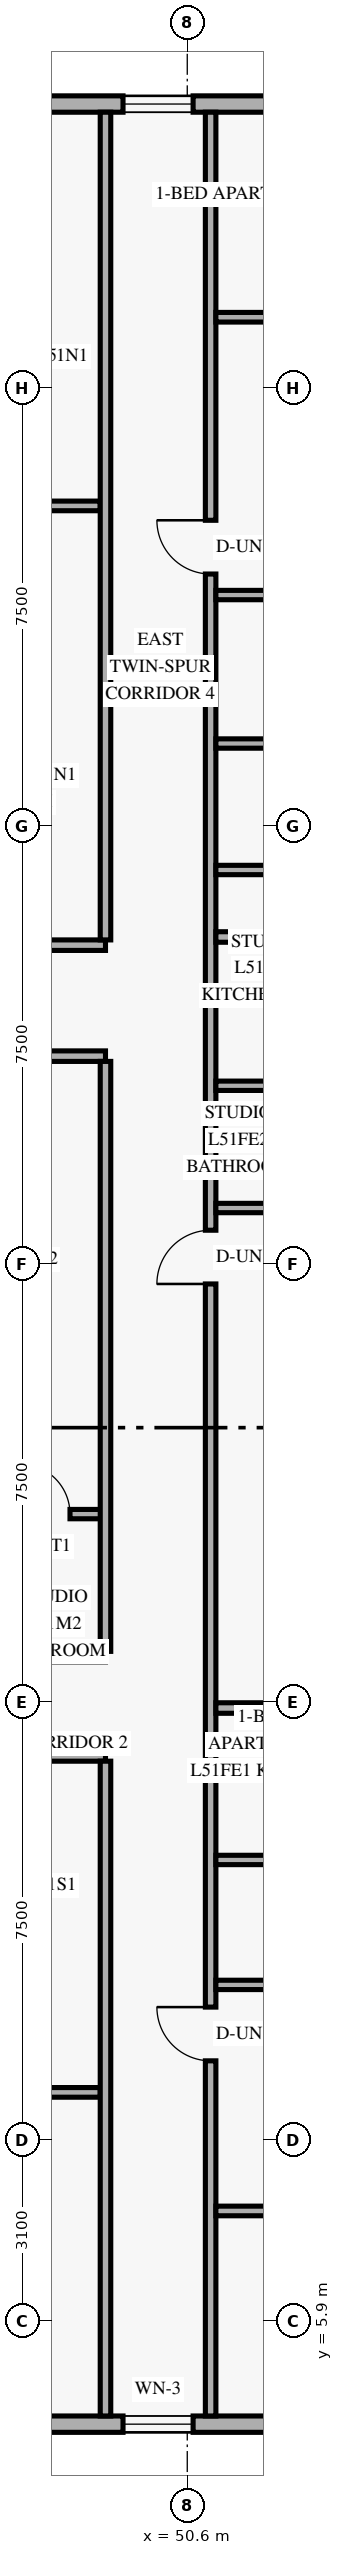
"""IFC4 building model, lengths in metres.
Left out: names, types, materials, properties, quantities, classifications, styles, units other than length and angle.
Written with IfcOpenShell. Run it as: python <this file> out.ifc"""

import sys

from ifc_helpers import new_model, si_unit, direction, frame, frame_2d, origin, place, context, subcontext, project, spatial, rectangle, extrude, element, fill, save


model = new_model("IFC4")
c1 = context("Model", 3, precision=1e-05, world=origin(), true_north=direction((0.0, 1.0)))
c2 = subcontext(c1, "Body", "Model", "MODEL_VIEW")
j1 = project(units=[si_unit("LENGTHUNIT", "METRE"), si_unit("PLANEANGLEUNIT", "RADIAN")], contexts=[c1])
p1 = place(None, origin())
s1 = spatial("IfcSite", under=j1, at=p1, CompositionType="ELEMENT")
p2 = place(p1, origin())
s2 = spatial("IfcBuilding", under=s1, at=p2, CompositionType="ELEMENT")
p3 = place(p2, frame((0.0, 0.0, 196.2)))
s3 = spatial("IfcBuildingStorey", under=s2, at=p3, CompositionType="ELEMENT", Elevation=196.2)
p4 = place(p3, frame((21.22, 4.14, 0.0), z_axis=(0.0, 0.0, 1.0), x_axis=(1.0, 0.0, 0.0)))
e1 = element("IfcWall", 1, at=p4, inside=s3, PredefinedType="SOLIDWALL", context=c2, shape_type="SweptSolid", body=[
    extrude(rectangle(XDim=33.76, YDim=0.28, at=frame_2d((16.88, 0.0))), origin(), (0.0, 0.0, 1.0), 3.3),
])
p5 = place(p4, frame((2.605, 0.0, 0.85)))
e2 = element("IfcOpeningElement", 2, at=p5, cuts=e1, PredefinedType="OPENING", context=c2, shape_type="SweptSolid", body=[
    extrude(rectangle(XDim=1.8, YDim=1.6, at=frame_2d((0.9, 0.8))), frame((0.0, 0.15, 0.0), z_axis=(0.0, -1.0, 0.0), x_axis=(1.0, 0.0, 0.0)), (0.0, 0.0, 1.0), 0.3),
])
p6 = place(p4, frame((9.49, 0.0, 0.85)))
e3 = element("IfcOpeningElement", 3, at=p6, cuts=e1, PredefinedType="OPENING", context=c2, shape_type="SweptSolid", body=[
    extrude(rectangle(XDim=1.8, YDim=1.6, at=frame_2d((0.9, 0.8))), frame((0.0, 0.15, 0.0), z_axis=(0.0, -1.0, 0.0), x_axis=(1.0, 0.0, 0.0)), (0.0, 0.0, 1.0), 0.3),
])
p7 = place(p4, frame((14.765, 0.0, 0.85)))
e4 = element("IfcOpeningElement", 4, at=p7, cuts=e1, PredefinedType="OPENING", context=c2, shape_type="SweptSolid", body=[
    extrude(rectangle(XDim=1.8, YDim=1.6, at=frame_2d((0.9, 0.8))), frame((0.0, 0.15, 0.0), z_axis=(0.0, -1.0, 0.0), x_axis=(1.0, 0.0, 0.0)), (0.0, 0.0, 1.0), 0.3),
])
p8 = place(p4, frame((19.16, 0.0, 0.85)))
e5 = element("IfcOpeningElement", 5, at=p8, cuts=e1, PredefinedType="OPENING", context=c2, shape_type="SweptSolid", body=[
    extrude(rectangle(XDim=1.8, YDim=1.6, at=frame_2d((0.9, 0.8))), frame((0.0, 0.15, 0.0), z_axis=(0.0, -1.0, 0.0), x_axis=(1.0, 0.0, 0.0)), (0.0, 0.0, 1.0), 0.3),
])
p9 = place(p4, frame((24.585, 0.0, 0.85)))
e6 = element("IfcOpeningElement", 6, at=p9, cuts=e1, PredefinedType="OPENING", context=c2, shape_type="SweptSolid", body=[
    extrude(rectangle(XDim=1.8, YDim=1.6, at=frame_2d((0.9, 0.8))), frame((0.0, 0.15, 0.0), z_axis=(0.0, -1.0, 0.0), x_axis=(1.0, 0.0, 0.0)), (0.0, 0.0, 1.0), 0.3),
])
p10 = place(p4, frame((28.28, 0.0, 0.85)))
e7 = element("IfcOpeningElement", 7, at=p10, cuts=e1, PredefinedType="OPENING", context=c2, shape_type="SweptSolid", body=[
    extrude(rectangle(XDim=1.2, YDim=1.5, at=frame_2d((0.6, 0.75))), frame((0.0, 0.15, 0.0), z_axis=(0.0, -1.0, 0.0), x_axis=(1.0, 0.0, 0.0)), (0.0, 0.0, 1.0), 0.3),
])
p11 = place(p4, frame((30.87, 0.0, 0.85)))
e8 = element("IfcOpeningElement", 8, at=p11, cuts=e1, PredefinedType="OPENING", context=c2, shape_type="SweptSolid", body=[
    extrude(rectangle(XDim=1.8, YDim=1.6, at=frame_2d((0.9, 0.8))), frame((0.0, 0.15, 0.0), z_axis=(0.0, -1.0, 0.0), x_axis=(1.0, 0.0, 0.0)), (0.0, 0.0, 1.0), 0.3),
])
p12 = place(p3, frame((54.98, 43.86, 0.0), z_axis=(0.0, 0.0, 1.0), x_axis=(-1.0, 0.0, 0.0)))
e9 = element("IfcWall", 9, at=p12, inside=s3, PredefinedType="SOLIDWALL", context=c2, shape_type="SweptSolid", body=[
    extrude(rectangle(XDim=33.76, YDim=0.28, at=frame_2d((16.88, 0.0))), origin(), (0.0, 0.0, 1.0), 3.3),
])
p13 = place(p12, frame((28.055, 0.0, 0.85)))
e10 = element("IfcOpeningElement", 10, at=p13, cuts=e9, PredefinedType="OPENING", context=c2, shape_type="SweptSolid", body=[
    extrude(rectangle(XDim=1.8, YDim=1.6, at=frame_2d((0.9, 0.8))), frame((0.0, 0.15, 0.0), z_axis=(0.0, -1.0, 0.0), x_axis=(1.0, 0.0, 0.0)), (0.0, 0.0, 1.0), 0.3),
])
p14 = place(p12, frame((21.17, 0.0, 0.85)))
e11 = element("IfcOpeningElement", 11, at=p14, cuts=e9, PredefinedType="OPENING", context=c2, shape_type="SweptSolid", body=[
    extrude(rectangle(XDim=1.8, YDim=1.6, at=frame_2d((0.9, 0.8))), frame((0.0, 0.15, 0.0), z_axis=(0.0, -1.0, 0.0), x_axis=(1.0, 0.0, 0.0)), (0.0, 0.0, 1.0), 0.3),
])
p15 = place(p12, frame((17.165, 0.0, 0.85)))
e12 = element("IfcOpeningElement", 12, at=p15, cuts=e9, PredefinedType="OPENING", context=c2, shape_type="SweptSolid", body=[
    extrude(rectangle(XDim=1.8, YDim=1.6, at=frame_2d((0.9, 0.8))), frame((0.0, 0.15, 0.0), z_axis=(0.0, -1.0, 0.0), x_axis=(1.0, 0.0, 0.0)), (0.0, 0.0, 1.0), 0.3),
])
p16 = place(p12, frame((12.77, 0.0, 0.85)))
e13 = element("IfcOpeningElement", 13, at=p16, cuts=e9, PredefinedType="OPENING", context=c2, shape_type="SweptSolid", body=[
    extrude(rectangle(XDim=1.8, YDim=1.6, at=frame_2d((0.9, 0.8))), frame((0.0, 0.15, 0.0), z_axis=(0.0, -1.0, 0.0), x_axis=(1.0, 0.0, 0.0)), (0.0, 0.0, 1.0), 0.3),
])
p17 = place(p12, frame((7.375, 0.0, 0.85)))
e14 = element("IfcOpeningElement", 14, at=p17, cuts=e9, PredefinedType="OPENING", context=c2, shape_type="SweptSolid", body=[
    extrude(rectangle(XDim=1.8, YDim=1.6, at=frame_2d((0.9, 0.8))), frame((0.0, 0.15, 0.0), z_axis=(0.0, -1.0, 0.0), x_axis=(1.0, 0.0, 0.0)), (0.0, 0.0, 1.0), 0.3),
])
p18 = place(p12, frame((4.28, 0.0, 0.85)))
e15 = element("IfcOpeningElement", 15, at=p18, cuts=e9, PredefinedType="OPENING", context=c2, shape_type="SweptSolid", body=[
    extrude(rectangle(XDim=1.2, YDim=1.5, at=frame_2d((0.6, 0.75))), frame((0.0, 0.15, 0.0), z_axis=(0.0, -1.0, 0.0), x_axis=(1.0, 0.0, 0.0)), (0.0, 0.0, 1.0), 0.3),
])
p19 = place(p12, frame((1.09, 0.0, 0.85)))
e16 = element("IfcOpeningElement", 16, at=p19, cuts=e9, PredefinedType="OPENING", context=c2, shape_type="SweptSolid", body=[
    extrude(rectangle(XDim=1.8, YDim=1.6, at=frame_2d((0.9, 0.8))), frame((0.0, 0.15, 0.0), z_axis=(0.0, -1.0, 0.0), x_axis=(1.0, 0.0, 0.0)), (0.0, 0.0, 1.0), 0.3),
])
p20 = place(p3, frame((38.433, 15.58, 0.0), z_axis=(0.0, 0.0, 1.0), x_axis=(1.0, 0.0, 0.0)))
e17 = element("IfcWall", 17, at=p20, inside=s3, PredefinedType="STANDARD", context=c2, shape_type="SweptSolid", body=[
    extrude(rectangle(XDim=10.767, YDim=0.18, at=frame_2d((5.384, 0.0))), origin(), (0.0, 0.0, 1.0), 2.67),
])
p21 = place(p20, frame((0.177, 0.0, 0.0)))
e18 = element("IfcOpeningElement", 18, at=p21, cuts=e17, PredefinedType="OPENING", context=c2, shape_type="SweptSolid", body=[
    extrude(rectangle(XDim=0.92, YDim=2.15, at=frame_2d((0.46, 1.075))), frame((0.0, 0.1, 0.0), z_axis=(0.0, -1.0, 0.0), x_axis=(1.0, 0.0, 0.0)), (0.0, 0.0, 1.0), 0.2),
])
p22 = place(p3, frame((37.64, 17.28, 0.0), z_axis=(0.0, 0.0, 1.0), x_axis=(1.0, 0.0, 0.0)))
e19 = element("IfcWall", 19, at=p22, inside=s3, PredefinedType="STANDARD", context=c2, shape_type="SweptSolid", body=[
    extrude(rectangle(XDim=11.56, YDim=0.18, at=frame_2d((5.78, 0.0))), origin(), (0.0, 0.0, 1.0), 2.67),
])
p23 = place(p22, frame((6.175, 0.0, 0.0)))
e20 = element("IfcOpeningElement", 20, at=p23, cuts=e19, PredefinedType="OPENING", context=c2, shape_type="SweptSolid", body=[
    extrude(rectangle(XDim=0.92, YDim=2.15, at=frame_2d((0.46, 1.075))), frame((0.0, 0.1, 0.0), z_axis=(0.0, -1.0, 0.0), x_axis=(1.0, 0.0, 0.0)), (0.0, 0.0, 1.0), 0.2),
])
p24 = place(p3, frame((37.64, 27.56, 0.0), z_axis=(0.0, 0.0, 1.0), x_axis=(1.0, 0.0, 0.0)))
e21 = element("IfcWall", 21, at=p24, inside=s3, PredefinedType="STANDARD", context=c2, shape_type="SweptSolid", body=[
    extrude(rectangle(XDim=11.56, YDim=0.18, at=frame_2d((5.78, 0.0))), origin(), (0.0, 0.0, 1.0), 2.67),
])
p25 = place(p3, frame((35.51, 29.46, 0.0), z_axis=(0.0, 0.0, 1.0), x_axis=(1.0, 0.0, 0.0)))
e22 = element("IfcWall", 22, at=p25, inside=s3, PredefinedType="STANDARD", context=c2, shape_type="SweptSolid", body=[
    extrude(rectangle(XDim=13.69, YDim=0.18, at=frame_2d((6.845, 0.0))), origin(), (0.0, 0.0, 1.0), 2.67),
])
p26 = place(p25, frame((0.32, 0.0, 0.0)))
e23 = element("IfcOpeningElement", 23, at=p26, cuts=e22, PredefinedType="OPENING", context=c2, shape_type="SweptSolid", body=[
    extrude(rectangle(XDim=0.92, YDim=2.15, at=frame_2d((0.46, 1.075))), frame((0.0, 0.1, 0.0), z_axis=(0.0, -1.0, 0.0), x_axis=(1.0, 0.0, 0.0)), (0.0, 0.0, 1.0), 0.2),
])
for number, where, z_axis, x_axis in (
    (24, (44.29, 9.82, 0.0), (0.0, 0.0, 1.0), (1.0, 0.0, 0.0)),
    (25, (44.29, 36.98, 0.0), (0.0, 0.0, 1.0), (1.0, 0.0, 0.0)),
):
    element("IfcWall", number, at=place(p3, frame(where, z_axis=z_axis, x_axis=x_axis)), inside=s3, PredefinedType="PARTITIONING", context=c2, shape_type="SweptSolid", body=[
        extrude(rectangle(XDim=4.82, YDim=0.165, at=frame_2d((2.41, 0.0))), origin(), (0.0, 0.0, 1.0), 2.67),
    ])
p27 = place(p3, frame((45.535, 19.72, 0.0), z_axis=(0.0, 0.0, 1.0), x_axis=(1.0, 0.0, 0.0)))
e26 = element("IfcWall", 26, at=p27, inside=s3, PredefinedType="PLUMBINGWALL", context=c2, shape_type="SweptSolid", body=[
    extrude(rectangle(XDim=3.665, YDim=0.16, at=frame_2d((1.833, 0.0))), origin(), (0.0, 0.0, 1.0), 2.67),
])
p28 = place(p27, frame((0.35, 0.0, 0.0)))
e27 = element("IfcOpeningElement", 27, at=p28, cuts=e26, PredefinedType="OPENING", context=c2, shape_type="SweptSolid", body=[
    extrude(rectangle(XDim=0.88, YDim=2.12, at=frame_2d((0.44, 1.06))), frame((0.0, 0.09, 0.0), z_axis=(0.0, -1.0, 0.0), x_axis=(1.0, 0.0, 0.0)), (0.0, 0.0, 1.0), 0.18),
])
p29 = place(p27, frame((2.198, 0.0, 0.0)))
e28 = element("IfcOpeningElement", 28, at=p29, cuts=e26, PredefinedType="OPENING", context=c2, shape_type="SweptSolid", body=[
    extrude(rectangle(XDim=0.86, YDim=2.12, at=frame_2d((0.43, 1.06))), frame((0.0, 0.09, 0.0), z_axis=(0.0, -1.0, 0.0), x_axis=(1.0, 0.0, 0.0)), (0.0, 0.0, 1.0), 0.18),
])
p30 = place(p3, frame((51.0, 4.28, 0.0), z_axis=(0.0, 0.0, 1.0), x_axis=(0.0, 1.0, 0.0)))
e29 = element("IfcWall", 29, at=p30, inside=s3, PredefinedType="STANDARD", context=c2, shape_type="SweptSolid", body=[
    extrude(rectangle(XDim=39.44, YDim=0.18, at=frame_2d((19.72, 0.0))), origin(), (0.0, 0.0, 1.0), 2.67),
])
p31 = place(p30, frame((6.08, 0.0, 0.0)))
e30 = element("IfcOpeningElement", 30, at=p31, cuts=e29, PredefinedType="OPENING", context=c2, shape_type="SweptSolid", body=[
    extrude(rectangle(XDim=0.92, YDim=2.15, at=frame_2d((0.46, 1.075))), frame((0.0, 0.1, 0.0), z_axis=(0.0, -1.0, 0.0), x_axis=(1.0, 0.0, 0.0)), (0.0, 0.0, 1.0), 0.2),
])
p32 = place(p30, frame((19.38, 0.0, 0.0)))
e31 = element("IfcOpeningElement", 31, at=p32, cuts=e29, PredefinedType="OPENING", context=c2, shape_type="SweptSolid", body=[
    extrude(rectangle(XDim=0.92, YDim=2.15, at=frame_2d((0.46, 1.075))), frame((0.0, 0.1, 0.0), z_axis=(0.0, -1.0, 0.0), x_axis=(1.0, 0.0, 0.0)), (0.0, 0.0, 1.0), 0.2),
])
p33 = place(p30, frame((31.534, 0.0, 0.0)))
e32 = element("IfcOpeningElement", 32, at=p33, cuts=e29, PredefinedType="OPENING", context=c2, shape_type="SweptSolid", body=[
    extrude(rectangle(XDim=0.92, YDim=2.15, at=frame_2d((0.46, 1.075))), frame((0.0, 0.1, 0.0), z_axis=(0.0, -1.0, 0.0), x_axis=(1.0, 0.0, 0.0)), (0.0, 0.0, 1.0), 0.2),
])
p34 = place(p3, frame((49.2, 4.28, 0.0), z_axis=(0.0, 0.0, 1.0), x_axis=(0.0, 1.0, 0.0)))
e33 = element("IfcWall", 33, at=p34, inside=s3, PredefinedType="STANDARD", context=c2, shape_type="SweptSolid", body=[
    extrude(rectangle(XDim=11.21, YDim=0.18, at=frame_2d((5.605, 0.0))), origin(), (0.0, 0.0, 1.0), 2.67),
])
p35 = place(p3, frame((49.2, 17.37, 0.0), z_axis=(0.0, 0.0, 1.0), x_axis=(0.0, 1.0, 0.0)))
e34 = element("IfcWall", 34, at=p35, inside=s3, PredefinedType="STANDARD", context=c2, shape_type="SweptSolid", body=[
    extrude(rectangle(XDim=10.1, YDim=0.18, at=frame_2d((5.05, 0.0))), origin(), (0.0, 0.0, 1.0), 2.67),
])
p36 = place(p3, frame((49.2, 29.55, 0.0), z_axis=(0.0, 0.0, 1.0), x_axis=(0.0, 1.0, 0.0)))
e35 = element("IfcWall", 35, at=p36, inside=s3, PredefinedType="STANDARD", context=c2, shape_type="SweptSolid", body=[
    extrude(rectangle(XDim=14.17, YDim=0.18, at=frame_2d((7.085, 0.0))), origin(), (0.0, 0.0, 1.0), 2.67),
])
p37 = place(p3, frame((51.09, 7.79, 0.0), z_axis=(0.0, 0.0, 1.0), x_axis=(1.0, 0.0, 0.0)))
e36 = element("IfcWall", 36, at=p37, inside=s3, PredefinedType="PARTITIONING", context=c2, shape_type="SweptSolid", body=[
    extrude(rectangle(XDim=7.23, YDim=0.165, at=frame_2d((3.615, 0.0))), origin(), (0.0, 0.0, 1.0), 2.819),
])
p38 = place(p37, frame((4.56, 0.0, 0.0)))
e37 = element("IfcOpeningElement", 37, at=p38, cuts=e36, PredefinedType="OPENING", context=c2, shape_type="SweptSolid", body=[
    extrude(rectangle(XDim=0.9, YDim=2.14, at=frame_2d((0.45, 1.07))), frame((0.0, 0.093, 0.0), z_axis=(0.0, -1.0, 0.0), x_axis=(1.0, 0.0, 0.0)), (0.0, 0.0, 1.0), 0.185),
])
p39 = place(p3, frame((51.09, 11.66, 0.0), z_axis=(0.0, 0.0, 1.0), x_axis=(1.0, 0.0, 0.0)))
e38 = element("IfcWall", 38, at=p39, inside=s3, PredefinedType="PLUMBINGWALL", context=c2, shape_type="SweptSolid", body=[
    extrude(rectangle(XDim=2.56, YDim=0.16, at=frame_2d((1.28, 0.0))), origin(), (0.0, 0.0, 1.0), 3.3),
])
p40 = place(p3, frame((51.09, 13.799, 0.0), z_axis=(0.0, 0.0, 1.0), x_axis=(1.0, 0.0, 0.0)))
e39 = element("IfcWall", 39, at=p40, inside=s3, PredefinedType="PLUMBINGWALL", context=c2, shape_type="SweptSolid", body=[
    extrude(rectangle(XDim=2.4, YDim=0.16, at=frame_2d((1.2, 0.0))), origin(), (0.0, 0.0, 1.0), 3.3),
])
p41 = place(p3, frame((51.09, 16.4, 0.0), z_axis=(0.0, 0.0, 1.0), x_axis=(1.0, 0.0, 0.0)))
e40 = element("IfcWall", 40, at=p41, inside=s3, PredefinedType="PARTITIONING", context=c2, shape_type="SweptSolid", body=[
    extrude(rectangle(XDim=7.23, YDim=0.18, at=frame_2d((3.615, 0.0))), origin(), (0.0, 0.0, 1.0), 2.819),
])
p42 = place(p3, frame((51.09, 24.96, 0.0), z_axis=(0.0, 0.0, 1.0), x_axis=(1.0, 0.0, 0.0)))
e41 = element("IfcWall", 41, at=p42, inside=s3, PredefinedType="PLUMBINGWALL", context=c2, shape_type="SweptSolid", body=[
    extrude(rectangle(XDim=2.606, YDim=0.16, at=frame_2d((1.303, 0.0))), origin(), (0.0, 0.0, 1.0), 2.743),
])
p43 = place(p3, frame((51.09, 27.053, 0.0), z_axis=(0.0, 0.0, 1.0), x_axis=(1.0, 0.0, 0.0)))
e42 = element("IfcWall", 42, at=p43, inside=s3, PredefinedType="PLUMBINGWALL", context=c2, shape_type="SweptSolid", body=[
    extrude(rectangle(XDim=2.446, YDim=0.16, at=frame_2d((1.223, 0.0))), origin(), (0.0, 0.0, 1.0), 2.743),
])
p44 = place(p3, frame((51.09, 29.6, 0.0), z_axis=(0.0, 0.0, 1.0), x_axis=(1.0, 0.0, 0.0)))
e43 = element("IfcWall", 43, at=p44, inside=s3, PredefinedType="PARTITIONING", context=c2, shape_type="SweptSolid", body=[
    extrude(rectangle(XDim=7.23, YDim=0.18, at=frame_2d((3.615, 0.0))), origin(), (0.0, 0.0, 1.0), 2.743),
])
p45 = place(p3, frame((51.09, 40.21, 0.0), z_axis=(0.0, 0.0, 1.0), x_axis=(1.0, 0.0, 0.0)))
e44 = element("IfcWall", 44, at=p45, inside=s3, PredefinedType="PARTITIONING", context=c2, shape_type="SweptSolid", body=[
    extrude(rectangle(XDim=7.23, YDim=0.165, at=frame_2d((3.615, 0.0))), origin(), (0.0, 0.0, 1.0), 2.819),
])
p46 = place(p45, frame((4.636, 0.0, 0.0)))
e45 = element("IfcOpeningElement", 45, at=p46, cuts=e44, PredefinedType="OPENING", context=c2, shape_type="SweptSolid", body=[
    extrude(rectangle(XDim=0.9, YDim=2.14, at=frame_2d((0.45, 1.07))), frame((0.0, 0.093, 0.0), z_axis=(0.0, -1.0, 0.0), x_axis=(1.0, 0.0, 0.0)), (0.0, 0.0, 1.0), 0.185),
])
for number, where, z_axis, x_axis in (
    (46, (51.09, 30.747, 0.0), (0.0, 0.0, 1.0), (1.0, 0.0, 0.0)),
    (47, (51.09, 35.454, 0.0), (0.0, 0.0, 1.0), (1.0, 0.0, 0.0)),
):
    element("IfcWall", number, at=place(p3, frame(where, z_axis=z_axis, x_axis=x_axis)), inside=s3, PredefinedType="PLUMBINGWALL", context=c2, shape_type="SweptSolid", body=[
        extrude(rectangle(XDim=2.712, YDim=0.16, at=frame_2d((1.356, 0.0))), origin(), (0.0, 0.0, 1.0), 3.3),
    ])
p47 = place(p3, frame((51.09, 32.912, 0.0), z_axis=(0.0, 0.0, 1.0), x_axis=(1.0, 0.0, 0.0)))
e48 = element("IfcWall", 48, at=p47, inside=s3, PredefinedType="PLUMBINGWALL", context=c2, shape_type="SweptSolid", body=[
    extrude(rectangle(XDim=2.552, YDim=0.16, at=frame_2d((1.276, 0.0))), origin(), (0.0, 0.0, 1.0), 3.3),
])
p48 = place(p10, origin())
e49 = element("IfcWindow", 49, at=p48, inside=s3, PartitioningType="SINGLE_PANEL", PredefinedType="WINDOW", context=c2, shape_type="SweptSolid", body=[
    extrude(rectangle(XDim=1.2, YDim=1.5, at=frame_2d((0.6, 0.75))), frame((0.0, 0.03, 0.0), z_axis=(0.0, -1.0, 0.0), x_axis=(1.0, 0.0, 0.0)), (0.0, 0.0, 1.0), 0.06),
])
fill(e7, e49)
p49 = place(p18, origin())
e50 = element("IfcWindow", 50, at=p49, inside=s3, PartitioningType="SINGLE_PANEL", PredefinedType="WINDOW", context=c2, shape_type="SweptSolid", body=[
    extrude(rectangle(XDim=1.2, YDim=1.5, at=frame_2d((0.6, 0.75))), frame((0.0, 0.03, 0.0), z_axis=(0.0, -1.0, 0.0), x_axis=(1.0, 0.0, 0.0)), (0.0, 0.0, 1.0), 0.06),
])
fill(e15, e50)
p50 = place(p29, origin())
e51 = element("IfcDoor", 51, at=p50, inside=s3, OperationType="SINGLE_SWING_LEFT", PredefinedType="DOOR", context=c2, shape_type="SweptSolid", body=[
    extrude(rectangle(XDim=0.86, YDim=2.12, at=frame_2d((0.43, 1.06))), frame((0.0, 0.025, 0.0), z_axis=(0.0, -1.0, 0.0), x_axis=(1.0, 0.0, 0.0)), (0.0, 0.0, 1.0), 0.05),
])
fill(e28, e51)
p51 = place(p31, origin())
e52 = element("IfcDoor", 52, at=p51, inside=s3, OperationType="SINGLE_SWING_RIGHT", PredefinedType="DOOR", context=c2, shape_type="SweptSolid", body=[
    extrude(rectangle(XDim=0.92, YDim=2.15, at=frame_2d((0.46, 1.075))), frame((0.0, 0.025, 0.0), z_axis=(0.0, -1.0, 0.0), x_axis=(1.0, 0.0, 0.0)), (0.0, 0.0, 1.0), 0.05),
])
fill(e30, e52)
p52 = place(p32, origin())
e53 = element("IfcDoor", 53, at=p52, inside=s3, OperationType="SINGLE_SWING_LEFT", PredefinedType="DOOR", context=c2, shape_type="SweptSolid", body=[
    extrude(rectangle(XDim=0.92, YDim=2.15, at=frame_2d((0.46, 1.075))), frame((0.0, 0.025, 0.0), z_axis=(0.0, -1.0, 0.0), x_axis=(1.0, 0.0, 0.0)), (0.0, 0.0, 1.0), 0.05),
])
fill(e31, e53)
p53 = place(p33, origin())
e54 = element("IfcDoor", 54, at=p53, inside=s3, OperationType="SINGLE_SWING_RIGHT", PredefinedType="DOOR", context=c2, shape_type="SweptSolid", body=[
    extrude(rectangle(XDim=0.92, YDim=2.15, at=frame_2d((0.46, 1.075))), frame((0.0, 0.025, 0.0), z_axis=(0.0, -1.0, 0.0), x_axis=(1.0, 0.0, 0.0)), (0.0, 0.0, 1.0), 0.05),
])
fill(e32, e54)
save(model, sys.argv[1])
